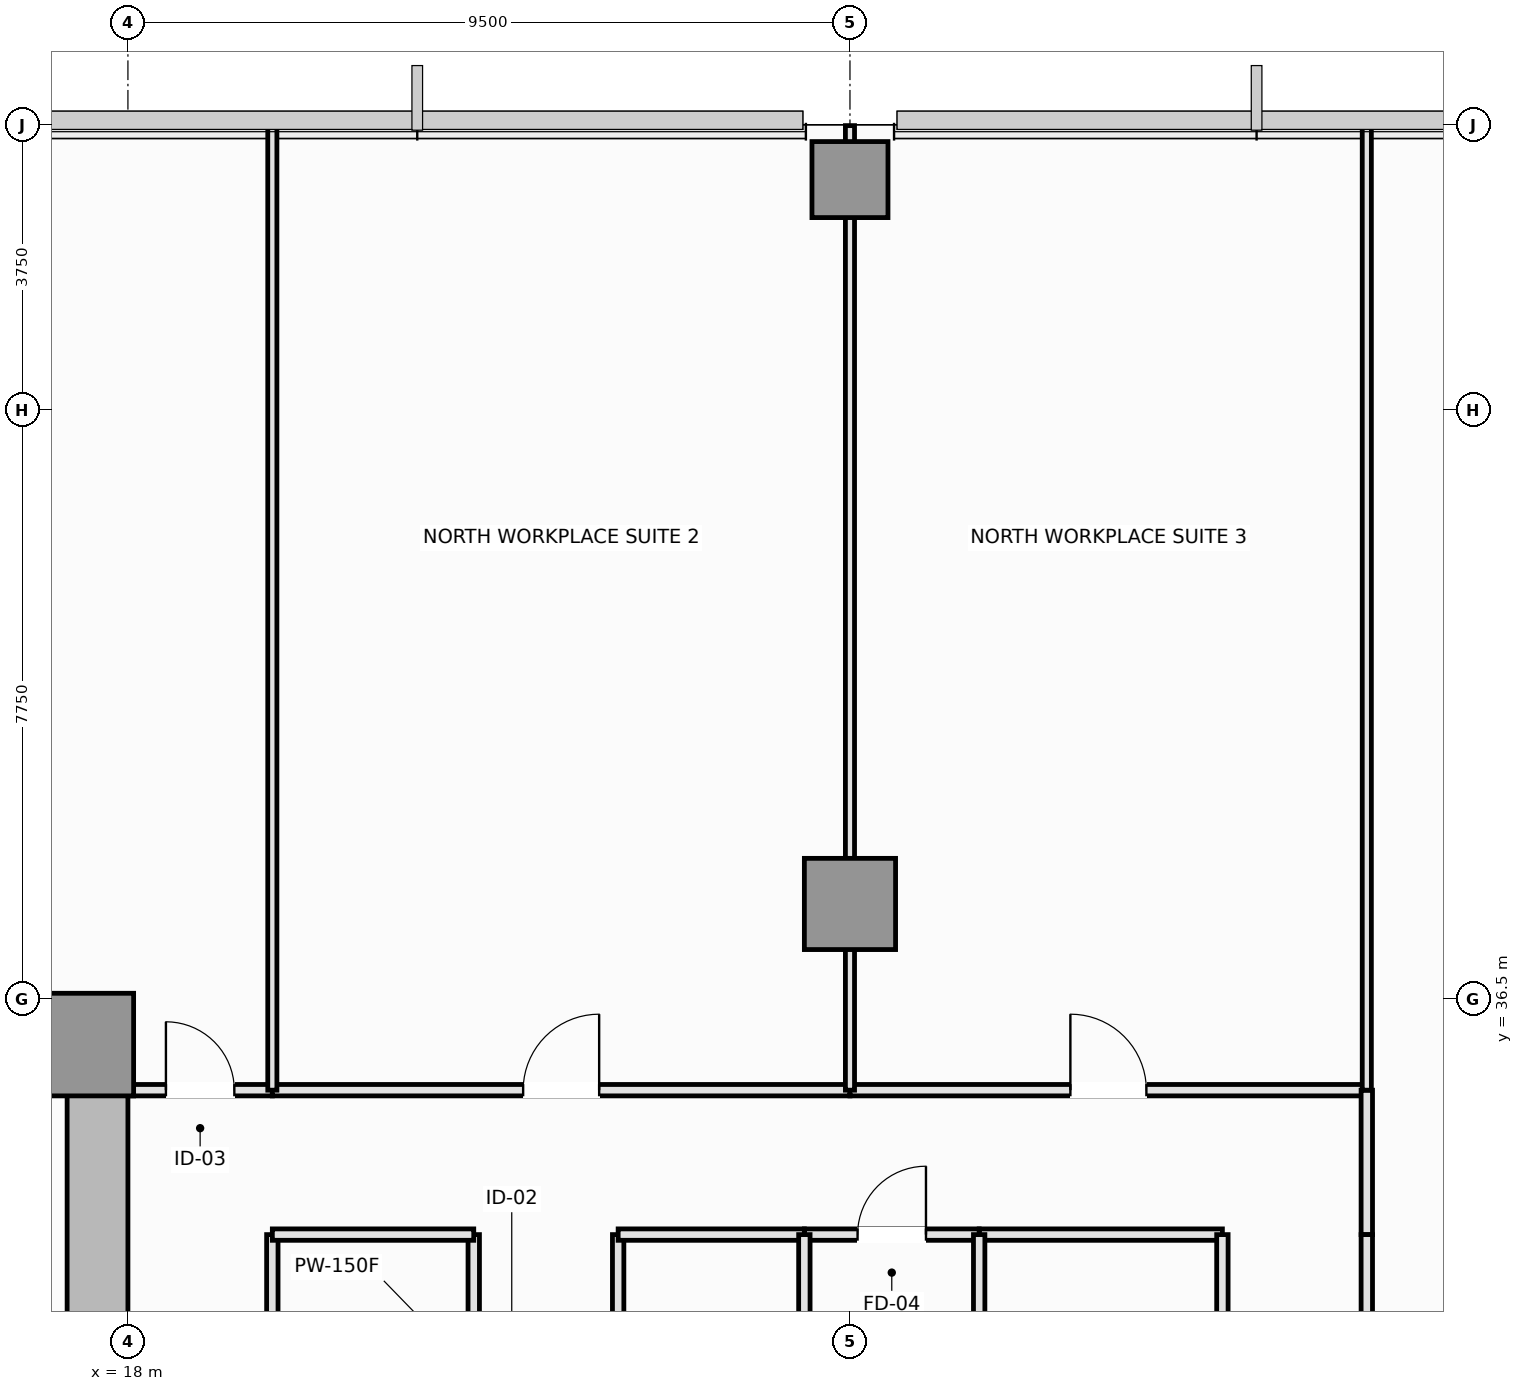
"""IFC4 building model, lengths in metres.
Left out: names, types, materials, properties, quantities, classifications, styles, units other than length and angle.
Written with IfcOpenShell. Run it as: python <this file> out.ifc"""

import sys

from ifc_helpers import new_model, si_unit, direction, frame, frame_2d, origin, origin_2d, place, context, subcontext, project, spatial, rectangle, extrude, element, fill, save


model = new_model("IFC4")
c1 = context("Model", 3, precision=1e-05, world=origin(), true_north=direction((0.0, 1.0)))
c2 = subcontext(c1, "Body", "Model", "MODEL_VIEW")
j1 = project(units=[si_unit("LENGTHUNIT", "METRE"), si_unit("PLANEANGLEUNIT", "RADIAN")], contexts=[c1])
p1 = place(None, origin())
s1 = spatial("IfcSite", under=j1, at=p1, CompositionType="ELEMENT")
p2 = place(p1, origin())
s2 = spatial("IfcBuilding", under=s1, at=p2, CompositionType="ELEMENT")
p3 = place(p2, frame((0.0, 0.0, 39.8)))
s3 = spatial("IfcBuildingStorey", under=s2, at=p3, CompositionType="ELEMENT", Elevation=39.8)
p4 = place(p3, frame((4.5, 36.1, 0.0), z_axis=(0.0, 0.0, 1.0), x_axis=(1.0, 0.0, 0.0)))
e1 = element("IfcWall", 1, at=p4, inside=s3, PredefinedType="SHEAR", context=c2, shape_type="SweptSolid", body=[
    extrude(rectangle(XDim=13.5, YDim=0.8, at=frame_2d((6.75, 0.0))), origin(), (0.0, 0.0, 1.0), 3.55),
])
p5 = place(p3, frame((17.6, 27.05, 0.0), z_axis=(0.0, 0.0, 1.0), x_axis=(0.0, 1.0, 0.0)))
e2 = element("IfcWall", 2, at=p5, inside=s3, PredefinedType="SHEAR", context=c2, shape_type="SweptSolid", body=[
    extrude(rectangle(XDim=8.65, YDim=0.8, at=frame_2d((4.325, 0.0))), origin(), (0.0, 0.0, 1.0), 3.55),
])
p6 = place(p5, frame((3.45, 0.0, 0.0)))
e3 = element("IfcOpeningElement", 3, at=p6, cuts=e2, PredefinedType="OPENING", context=c2, shape_type="SweptSolid", body=[
    extrude(rectangle(XDim=1.1, YDim=2.15, at=frame_2d((0.55, 1.075))), frame((0.0, 0.41, 0.0), z_axis=(0.0, -1.0, 0.0), x_axis=(1.0, 0.0, 0.0)), (0.0, 0.0, 1.0), 0.82),
])
p7 = place(p3, frame((17.4, 35.9, 0.0), z_axis=(0.0, 0.0, 1.0), x_axis=(1.0, 0.0, 0.0)))
e4 = element("IfcColumn", 4, at=p7, inside=s3, PredefinedType="PILASTER", context=c2, shape_type="SweptSolid", body=[
    extrude(rectangle(XDim=1.35, YDim=1.35, at=origin_2d()), origin(), (0.0, 0.0, 1.0), 3.55),
])
p8 = place(p3, frame((27.5, 37.75, 0.0), z_axis=(0.0, 0.0, 1.0), x_axis=(1.0, 0.0, 0.0)))
e5 = element("IfcColumn", 5, at=p8, inside=s3, PredefinedType="COLUMN", context=c2, shape_type="SweptSolid", body=[
    extrude(rectangle(XDim=1.2, YDim=1.2, at=origin_2d()), origin(), (0.0, 0.0, 1.0), 3.55),
])
p9 = place(p3, frame((27.5, 47.28, 0.0), z_axis=(0.0, 0.0, 1.0), x_axis=(1.0, 0.0, 0.0)))
e6 = element("IfcColumn", 6, at=p9, inside=s3, PredefinedType="COLUMN", context=c2, shape_type="SweptSolid", body=[
    extrude(rectangle(XDim=1.0, YDim=1.0, at=origin_2d()), origin(), (0.0, 0.0, 1.0), 3.55),
])
p10 = place(p3, frame((22.55, 29.75, 0.0), z_axis=(0.0, 0.0, 1.0), x_axis=(0.0, 1.0, 0.0)))
e7 = element("IfcWall", 7, at=p10, inside=s3, PredefinedType="PARTITIONING", context=c2, shape_type="SweptSolid", body=[
    extrude(rectangle(XDim=3.65, YDim=0.15, at=frame_2d((1.825, 0.0))), origin(), (0.0, 0.0, 1.0), 3.01),
])
p11 = place(p10, frame((1.325, 0.0, 0.0)))
e8 = element("IfcOpeningElement", 8, at=p11, cuts=e7, PredefinedType="OPENING", context=c2, shape_type="SweptSolid", body=[
    extrude(rectangle(XDim=1.0, YDim=2.15, at=frame_2d((0.5, 1.075))), frame((0.0, 0.085, 0.0), z_axis=(0.0, -1.0, 0.0), x_axis=(1.0, 0.0, 0.0)), (0.0, 0.0, 1.0), 0.17),
])
p12 = place(p3, frame((24.45, 30.3, 0.0), z_axis=(0.0, 0.0, 1.0), x_axis=(0.0, 1.0, 0.0)))
e9 = element("IfcWall", 9, at=p12, inside=s3, PredefinedType="PARTITIONING", context=c2, shape_type="SweptSolid", body=[
    extrude(rectangle(XDim=3.1, YDim=0.15, at=frame_2d((1.55, 0.0))), origin(), (0.0, 0.0, 1.0), 3.37),
])
p13 = place(p12, frame((1.05, 0.0, 0.0)))
e10 = element("IfcOpeningElement", 10, at=p13, cuts=e9, PredefinedType="OPENING", context=c2, shape_type="SweptSolid", body=[
    extrude(rectangle(XDim=1.0, YDim=2.15, at=frame_2d((0.5, 1.075))), frame((0.0, 0.085, 0.0), z_axis=(0.0, -1.0, 0.0), x_axis=(1.0, 0.0, 0.0)), (0.0, 0.0, 1.0), 0.17),
])
p14 = place(p3, frame((19.9, 29.75, 0.0), z_axis=(0.0, 0.0, 1.0), x_axis=(0.0, 1.0, 0.0)))
e11 = element("IfcWall", 11, at=p14, inside=s3, PredefinedType="PARTITIONING", context=c2, shape_type="SweptSolid", body=[
    extrude(rectangle(XDim=3.65, YDim=0.15, at=frame_2d((1.825, 0.0))), origin(), (0.0, 0.0, 1.0), 3.37),
])
p15 = place(p3, frame((19.9, 33.4, 0.0), z_axis=(0.0, 0.0, 1.0), x_axis=(1.0, 0.0, 0.0)))
e12 = element("IfcWall", 12, at=p15, inside=s3, PredefinedType="PARTITIONING", context=c2, shape_type="SweptSolid", body=[
    extrude(rectangle(XDim=2.65, YDim=0.15, at=frame_2d((1.325, 0.0))), origin(), (0.0, 0.0, 1.0), 3.37),
])
p16 = place(p3, frame((29.2, 33.4, 0.0), z_axis=(0.0, 0.0, 1.0), x_axis=(1.0, 0.0, 0.0)))
e13 = element("IfcWall", 13, at=p16, inside=s3, PredefinedType="PLUMBINGWALL", context=c2, shape_type="SweptSolid", body=[
    extrude(rectangle(XDim=3.2, YDim=0.15, at=frame_2d((1.6, 0.0))), origin(), (0.0, 0.0, 1.0), 3.37),
])
p17 = place(p3, frame((26.9, 33.4, 0.0), z_axis=(0.0, 0.0, 1.0), x_axis=(1.0, 0.0, 0.0)))
e14 = element("IfcWall", 14, at=p17, inside=s3, PredefinedType="PLUMBINGWALL", context=c2, shape_type="SweptSolid", body=[
    extrude(rectangle(XDim=2.3, YDim=0.15, at=frame_2d((1.15, 0.0))), origin(), (0.0, 0.0, 1.0), 3.37),
])
p18 = place(p17, frame((0.7, 0.0, 0.0)))
e15 = element("IfcOpeningElement", 15, at=p18, cuts=e14, PredefinedType="OPENING", context=c2, shape_type="SweptSolid", body=[
    extrude(rectangle(XDim=0.9, YDim=2.1, at=frame_2d((0.45, 1.05))), frame((0.0, 0.085, 0.0), z_axis=(0.0, -1.0, 0.0), x_axis=(1.0, 0.0, 0.0)), (0.0, 0.0, 1.0), 0.17),
])
p19 = place(p3, frame((24.45, 33.4, 0.0), z_axis=(0.0, 0.0, 1.0), x_axis=(1.0, 0.0, 0.0)))
e16 = element("IfcWall", 16, at=p19, inside=s3, PredefinedType="PARTITIONING", context=c2, shape_type="SweptSolid", body=[
    extrude(rectangle(XDim=2.45, YDim=0.15, at=frame_2d((1.225, 0.0))), origin(), (0.0, 0.0, 1.0), 3.37),
])
p20 = place(p3, frame((18.0, 35.3, 0.0), z_axis=(0.0, 0.0, 1.0), x_axis=(1.0, 0.0, 0.0)))
e17 = element("IfcWall", 17, at=p20, inside=s3, PredefinedType="PARTITIONING", context=c2, shape_type="SweptSolid", body=[
    extrude(rectangle(XDim=1.9, YDim=0.15, at=frame_2d((0.95, 0.0))), origin(), (0.0, 0.0, 1.0), 3.37),
])
p21 = place(p20, frame((0.5, 0.0, 0.0)))
e18 = element("IfcOpeningElement", 18, at=p21, cuts=e17, PredefinedType="OPENING", context=c2, shape_type="SweptSolid", body=[
    extrude(rectangle(XDim=0.9, YDim=2.1, at=frame_2d((0.45, 1.05))), frame((0.0, 0.085, 0.0), z_axis=(0.0, -1.0, 0.0), x_axis=(1.0, 0.0, 0.0)), (0.0, 0.0, 1.0), 0.17),
])
p22 = place(p3, frame((19.9, 35.3, 0.0), z_axis=(0.0, 0.0, 1.0), x_axis=(1.0, 0.0, 0.0)))
e19 = element("IfcWall", 19, at=p22, inside=s3, PredefinedType="PARTITIONING", context=c2, shape_type="SweptSolid", body=[
    extrude(rectangle(XDim=7.6, YDim=0.15, at=frame_2d((3.8, 0.0))), origin(), (0.0, 0.0, 1.0), 3.37),
])
p23 = place(p22, frame((3.3, 0.0, 0.0)))
e20 = element("IfcOpeningElement", 20, at=p23, cuts=e19, PredefinedType="OPENING", context=c2, shape_type="SweptSolid", body=[
    extrude(rectangle(XDim=1.0, YDim=2.15, at=frame_2d((0.5, 1.075))), frame((0.0, 0.085, 0.0), z_axis=(0.0, -1.0, 0.0), x_axis=(1.0, 0.0, 0.0)), (0.0, 0.0, 1.0), 0.17),
])
p24 = place(p3, frame((27.5, 35.3, 0.0), z_axis=(0.0, 0.0, 1.0), x_axis=(1.0, 0.0, 0.0)))
e21 = element("IfcWall", 21, at=p24, inside=s3, PredefinedType="PARTITIONING", context=c2, shape_type="SweptSolid", body=[
    extrude(rectangle(XDim=6.8, YDim=0.15, at=frame_2d((3.4, 0.0))), origin(), (0.0, 0.0, 1.0), 3.37),
])
p25 = place(p24, frame((2.9, 0.0, 0.0)))
e22 = element("IfcOpeningElement", 22, at=p25, cuts=e21, PredefinedType="OPENING", context=c2, shape_type="SweptSolid", body=[
    extrude(rectangle(XDim=1.0, YDim=2.15, at=frame_2d((0.5, 1.075))), frame((0.0, 0.085, 0.0), z_axis=(0.0, -1.0, 0.0), x_axis=(1.0, 0.0, 0.0)), (0.0, 0.0, 1.0), 0.17),
])
p26 = place(p3, frame((34.3, 33.4, 0.0), z_axis=(0.0, 0.0, 1.0), x_axis=(0.0, 1.0, 0.0)))
e23 = element("IfcWall", 23, at=p26, inside=s3, PredefinedType="PARTITIONING", context=c2, shape_type="SweptSolid", body=[
    extrude(rectangle(XDim=1.9, YDim=0.15, at=frame_2d((0.95, 0.0))), origin(), (0.0, 0.0, 1.0), 3.37),
])
p27 = place(p3, frame((32.4, 30.3, 0.0), z_axis=(0.0, 0.0, 1.0), x_axis=(0.0, 1.0, 0.0)))
e24 = element("IfcWall", 24, at=p27, inside=s3, PredefinedType="PLUMBINGWALL", context=c2, shape_type="SweptSolid", body=[
    extrude(rectangle(XDim=3.1, YDim=0.15, at=frame_2d((1.55, 0.0))), origin(), (0.0, 0.0, 1.0), 3.37),
])
p28 = place(p27, frame((1.1, 0.0, 0.0)))
e25 = element("IfcOpeningElement", 25, at=p28, cuts=e24, PredefinedType="OPENING", context=c2, shape_type="SweptSolid", body=[
    extrude(rectangle(XDim=0.9, YDim=2.1, at=frame_2d((0.45, 1.05))), frame((0.0, 0.085, 0.0), z_axis=(0.0, -1.0, 0.0), x_axis=(1.0, 0.0, 0.0)), (0.0, 0.0, 1.0), 0.17),
])
p29 = place(p3, frame((34.3, 25.25, 0.0), z_axis=(0.0, 0.0, 1.0), x_axis=(0.0, 1.0, 0.0)))
e26 = element("IfcWall", 26, at=p29, inside=s3, PredefinedType="PARTITIONING", context=c2, shape_type="SweptSolid", body=[
    extrude(rectangle(XDim=8.15, YDim=0.15, at=frame_2d((4.075, 0.0))), origin(), (0.0, 0.0, 1.0), 3.37),
])
p30 = place(p29, frame((3.575, 0.0, 0.0)))
e27 = element("IfcOpeningElement", 27, at=p30, cuts=e26, PredefinedType="OPENING", context=c2, shape_type="SweptSolid", body=[
    extrude(rectangle(XDim=1.0, YDim=2.15, at=frame_2d((0.5, 1.075))), frame((0.0, 0.085, 0.0), z_axis=(0.0, -1.0, 0.0), x_axis=(1.0, 0.0, 0.0)), (0.0, 0.0, 1.0), 0.17),
])
for number, where, z_axis, x_axis in (
    (28, (29.2, 30.3, 0.0), (0.0, 0.0, 1.0), (0.0, 1.0, 0.0)),
    (29, (26.9, 30.3, 0.0), (0.0, 0.0, 1.0), (0.0, 1.0, 0.0)),
):
    element("IfcWall", number, at=place(p3, frame(where, z_axis=z_axis, x_axis=x_axis)), inside=s3, PredefinedType="PLUMBINGWALL", context=c2, shape_type="SweptSolid", body=[
        extrude(rectangle(XDim=3.1, YDim=0.15, at=frame_2d((1.55, 0.0))), origin(), (0.0, 0.0, 1.0), 3.37),
    ])
p31 = place(p3, frame((19.9, 35.3, 0.0), z_axis=(0.0, 0.0, 1.0), x_axis=(0.0, 1.0, 0.0)))
e30 = element("IfcWall", 30, at=p31, inside=s3, PredefinedType="PARTITIONING", context=c2, shape_type="SweptSolid", body=[
    extrude(rectangle(XDim=12.69, YDim=0.12, at=frame_2d((6.345, 0.0))), origin(), (0.0, 0.0, 1.0), 3.37),
])
p32 = place(p3, frame((27.5, 35.3, 0.0), z_axis=(0.0, 0.0, 1.0), x_axis=(0.0, 1.0, 0.0)))
e31 = element("IfcWall", 31, at=p32, inside=s3, PredefinedType="PARTITIONING", context=c2, shape_type="SweptSolid", body=[
    extrude(rectangle(XDim=12.69, YDim=0.12, at=frame_2d((6.345, 0.0))), origin(), (0.0, 0.0, 1.0), 2.82),
])
p33 = place(p3, frame((34.3, 35.3, 0.0), z_axis=(0.0, 0.0, 1.0), x_axis=(0.0, 1.0, 0.0)))
e32 = element("IfcWall", 32, at=p33, inside=s3, PredefinedType="PARTITIONING", context=c2, shape_type="SweptSolid", body=[
    extrude(rectangle(XDim=12.69, YDim=0.12, at=frame_2d((6.345, 0.0))), origin(), (0.0, 0.0, 1.0), 3.37),
])
p34 = place(p18, origin())
e33 = element("IfcDoor", 33, at=p34, inside=s3, OperationType="SINGLE_SWING_RIGHT", PredefinedType="DOOR", context=c2, shape_type="SweptSolid", body=[
    extrude(rectangle(XDim=0.9, YDim=2.1, at=frame_2d((0.45, 1.05))), frame((0.0, 0.025, 0.0), z_axis=(0.0, -1.0, 0.0), x_axis=(1.0, 0.0, 0.0)), (0.0, 0.0, 1.0), 0.05),
])
fill(e15, e33)
p35 = place(p21, origin())
e34 = element("IfcDoor", 34, at=p35, inside=s3, OperationType="SINGLE_SWING_LEFT", PredefinedType="DOOR", context=c2, shape_type="SweptSolid", body=[
    extrude(rectangle(XDim=0.9, YDim=2.1, at=frame_2d((0.45, 1.05))), frame((0.0, 0.025, 0.0), z_axis=(0.0, -1.0, 0.0), x_axis=(1.0, 0.0, 0.0)), (0.0, 0.0, 1.0), 0.05),
])
fill(e18, e34)
p36 = place(p23, origin())
e35 = element("IfcDoor", 35, at=p36, inside=s3, OperationType="SINGLE_SWING_RIGHT", PredefinedType="DOOR", context=c2, shape_type="SweptSolid", body=[
    extrude(rectangle(XDim=1.0, YDim=2.15, at=frame_2d((0.5, 1.075))), frame((0.0, 0.025, 0.0), z_axis=(0.0, -1.0, 0.0), x_axis=(1.0, 0.0, 0.0)), (0.0, 0.0, 1.0), 0.05),
])
fill(e20, e35)
p37 = place(p25, origin())
e36 = element("IfcDoor", 36, at=p37, inside=s3, OperationType="SINGLE_SWING_LEFT", PredefinedType="DOOR", context=c2, shape_type="SweptSolid", body=[
    extrude(rectangle(XDim=1.0, YDim=2.15, at=frame_2d((0.5, 1.075))), frame((0.0, 0.025, 0.0), z_axis=(0.0, -1.0, 0.0), x_axis=(1.0, 0.0, 0.0)), (0.0, 0.0, 1.0), 0.05),
])
fill(e22, e36)
save(model, sys.argv[1])
